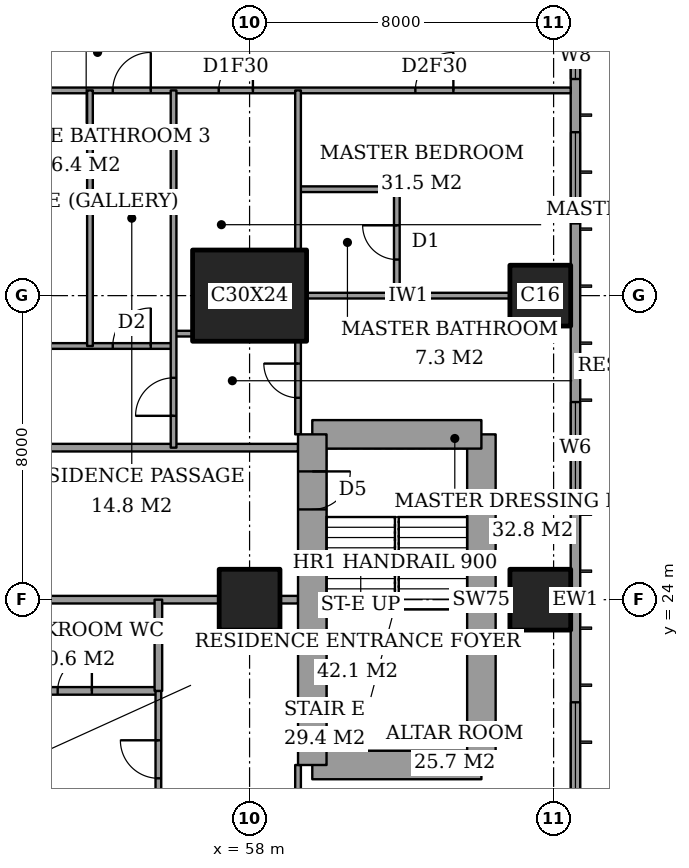
"""IFC4 building model, lengths in metres.
Left out: names, types, materials, properties, quantities, classifications, styles, units other than length and angle.
Written with IfcOpenShell. Run it as: python <this file> out.ifc"""

import sys

from ifc_helpers import new_model, si_unit, direction, frame, frame_2d, origin, origin_2d, place, context, subcontext, project, spatial, rectangle, extrude, element, fill, save


model = new_model("IFC4")
c1 = context("Model", 3, precision=1e-05, world=origin(), true_north=direction((0.0, 1.0)))
c2 = subcontext(c1, "Body", "Model", "MODEL_VIEW")
j1 = project(units=[si_unit("LENGTHUNIT", "METRE"), si_unit("PLANEANGLEUNIT", "RADIAN")], contexts=[c1])
p1 = place(None, origin())
s1 = spatial("IfcSite", under=j1, at=p1, CompositionType="ELEMENT")
p2 = place(p1, origin())
s2 = spatial("IfcBuilding", under=s1, at=p2, CompositionType="ELEMENT")
p3 = place(p2, frame((0.0, 0.0, 255.6)))
s3 = spatial("IfcBuildingStorey", under=s2, at=p3, CompositionType="ELEMENT", Elevation=255.6)
p4 = place(p3, frame((58.0, 24.0, 0.0), z_axis=(0.0, 0.0, 1.0), x_axis=(1.0, 0.0, 0.0)))
e1 = element("IfcColumn", 1, at=p4, inside=s3, PredefinedType="COLUMN", context=c2, shape_type="SweptSolid", body=[
    extrude(rectangle(XDim=1.6, YDim=1.6, at=origin_2d()), origin(), (0.0, 0.0, 1.0), 3.6),
])
p5 = place(p3, frame((58.0, 32.0, 0.0), z_axis=(0.0, 0.0, 1.0), x_axis=(1.0, 0.0, 0.0)))
e2 = element("IfcColumn", 2, at=p5, inside=s3, PredefinedType="COLUMN", context=c2, shape_type="SweptSolid", body=[
    extrude(rectangle(XDim=3.0, YDim=2.4, at=origin_2d()), origin(), (0.0, 0.0, 1.0), 3.6),
])
for number, where, z_axis, x_axis in (
    (3, (65.65, 24.0, 0.0), (0.0, 0.0, 1.0), (1.0, 0.0, 0.0)),
    (4, (65.65, 32.0, 0.0), (0.0, 0.0, 1.0), (1.0, 0.0, 0.0)),
):
    element("IfcColumn", number, at=place(p3, frame(where, z_axis=z_axis, x_axis=x_axis)), inside=s3, PredefinedType="COLUMN", context=c2, shape_type="SweptSolid", body=[
        extrude(rectangle(XDim=1.6, YDim=1.6, at=origin_2d()), origin(), (0.0, 0.0, 1.0), 3.6),
    ])
p6 = place(p3, frame((59.65, 19.65, 0.0), z_axis=(0.0, 0.0, 1.0), x_axis=(1.0, 0.0, 0.0)))
e5 = element("IfcWall", 5, at=p6, inside=s3, PredefinedType="SHEAR", context=c2, shape_type="SweptSolid", body=[
    extrude(rectangle(XDim=4.45, YDim=0.75, at=frame_2d((2.225, 0.0))), origin(), (0.0, 0.0, 1.0), 3.6),
])
p7 = place(p3, frame((64.1, 19.65, 0.0), z_axis=(0.0, 0.0, 1.0), x_axis=(0.0, 1.0, 0.0)))
e6 = element("IfcWall", 6, at=p7, inside=s3, PredefinedType="SHEAR", context=c2, shape_type="SweptSolid", body=[
    extrude(rectangle(XDim=8.7, YDim=0.75, at=frame_2d((4.35, 0.0))), origin(), (0.0, 0.0, 1.0), 3.6),
])
p8 = place(p3, frame((64.1, 28.35, 0.0), z_axis=(0.0, 0.0, 1.0), x_axis=(-1.0, 0.0, 0.0)))
e7 = element("IfcWall", 7, at=p8, inside=s3, PredefinedType="SHEAR", context=c2, shape_type="SweptSolid", body=[
    extrude(rectangle(XDim=4.45, YDim=0.75, at=frame_2d((2.225, 0.0))), origin(), (0.0, 0.0, 1.0), 3.6),
])
p9 = place(p3, frame((59.65, 28.35, 0.0), z_axis=(0.0, 0.0, 1.0), x_axis=(0.0, -1.0, 0.0)))
e8 = element("IfcWall", 8, at=p9, inside=s3, PredefinedType="SHEAR", context=c2, shape_type="SweptSolid", body=[
    extrude(rectangle(XDim=8.7, YDim=0.75, at=frame_2d((4.35, 0.0))), origin(), (0.0, 0.0, 1.0), 3.6),
])
p10 = place(p9, frame((0.975, 0.0, 0.0)))
e9 = element("IfcOpeningElement", 9, at=p10, cuts=e8, PredefinedType="OPENING", context=c2, shape_type="SweptSolid", body=[
    extrude(rectangle(XDim=1.0, YDim=2.1, at=frame_2d((0.5, 1.05))), frame((0.0, 0.385, 0.0), z_axis=(0.0, -1.0, 0.0), x_axis=(1.0, 0.0, 0.0)), (0.0, 0.0, 1.0), 0.77),
])
p11 = place(p3, frame((66.575, 3.175, 0.0), z_axis=(0.0, 0.0, 1.0), x_axis=(0.0, 1.0, 0.0)))
e10 = element("IfcWall", 10, at=p11, inside=s3, PredefinedType="SOLIDWALL", context=c2, shape_type="SweptSolid", body=[
    extrude(rectangle(XDim=41.65, YDim=0.25, at=frame_2d((20.825, 0.0))), origin(), (0.0, 0.0, 1.0), 3.6),
])
p12 = place(p11, frame((0.875, 0.0, 0.6)))
e11 = element("IfcOpeningElement", 11, at=p12, cuts=e10, PredefinedType="OPENING", context=c2, shape_type="SweptSolid", body=[
    extrude(rectangle(XDim=2.4, YDim=2.0, at=frame_2d((1.2, 1.0))), frame((0.0, 0.135, 0.0), z_axis=(0.0, -1.0, 0.0), x_axis=(1.0, 0.0, 0.0)), (0.0, 0.0, 1.0), 0.27),
])
p13 = place(p11, frame((6.6, 0.0, 0.6)))
e12 = element("IfcOpeningElement", 12, at=p13, cuts=e10, PredefinedType="OPENING", context=c2, shape_type="SweptSolid", body=[
    extrude(rectangle(XDim=1.2, YDim=2.0, at=frame_2d((0.6, 1.0))), frame((0.0, 0.135, 0.0), z_axis=(0.0, -1.0, 0.0), x_axis=(1.0, 0.0, 0.0)), (0.0, 0.0, 1.0), 0.27),
])
p14 = place(p11, frame((8.825, 0.0, 0.6)))
e13 = element("IfcOpeningElement", 13, at=p14, cuts=e10, PredefinedType="OPENING", context=c2, shape_type="SweptSolid", body=[
    extrude(rectangle(XDim=2.4, YDim=2.0, at=frame_2d((1.2, 1.0))), frame((0.0, 0.135, 0.0), z_axis=(0.0, -1.0, 0.0), x_axis=(1.0, 0.0, 0.0)), (0.0, 0.0, 1.0), 0.27),
])
p15 = place(p11, frame((15.725, 0.0, 0.6)))
e14 = element("IfcOpeningElement", 14, at=p15, cuts=e10, PredefinedType="OPENING", context=c2, shape_type="SweptSolid", body=[
    extrude(rectangle(XDim=2.4, YDim=2.0, at=frame_2d((1.2, 1.0))), frame((0.0, 0.135, 0.0), z_axis=(0.0, -1.0, 0.0), x_axis=(1.0, 0.0, 0.0)), (0.0, 0.0, 1.0), 0.27),
])
p16 = place(p11, frame((23.625, 0.0, 0.6)))
e15 = element("IfcOpeningElement", 15, at=p16, cuts=e10, PredefinedType="OPENING", context=c2, shape_type="SweptSolid", body=[
    extrude(rectangle(XDim=2.4, YDim=2.0, at=frame_2d((1.2, 1.0))), frame((0.0, 0.135, 0.0), z_axis=(0.0, -1.0, 0.0), x_axis=(1.0, 0.0, 0.0)), (0.0, 0.0, 1.0), 0.27),
])
p17 = place(p11, frame((30.725, 0.0, 0.6)))
e16 = element("IfcOpeningElement", 16, at=p17, cuts=e10, PredefinedType="OPENING", context=c2, shape_type="SweptSolid", body=[
    extrude(rectangle(XDim=2.4, YDim=2.0, at=frame_2d((1.2, 1.0))), frame((0.0, 0.135, 0.0), z_axis=(0.0, -1.0, 0.0), x_axis=(1.0, 0.0, 0.0)), (0.0, 0.0, 1.0), 0.27),
])
p18 = place(p11, frame((34.525, 0.0, 0.6)))
e17 = element("IfcOpeningElement", 17, at=p18, cuts=e10, PredefinedType="OPENING", context=c2, shape_type="SweptSolid", body=[
    extrude(rectangle(XDim=1.2, YDim=2.0, at=frame_2d((0.6, 1.0))), frame((0.0, 0.135, 0.0), z_axis=(0.0, -1.0, 0.0), x_axis=(1.0, 0.0, 0.0)), (0.0, 0.0, 1.0), 0.27),
])
p19 = place(p11, frame((38.375, 0.0, 0.6)))
e18 = element("IfcOpeningElement", 18, at=p19, cuts=e10, PredefinedType="OPENING", context=c2, shape_type="SweptSolid", body=[
    extrude(rectangle(XDim=2.4, YDim=2.0, at=frame_2d((1.2, 1.0))), frame((0.0, 0.135, 0.0), z_axis=(0.0, -1.0, 0.0), x_axis=(1.0, 0.0, 0.0)), (0.0, 0.0, 1.0), 0.27),
])
p20 = place(p3, frame((51.2, 21.6, 0.0), z_axis=(0.0, 0.0, 1.0), x_axis=(1.0, 0.0, 0.0)))
e19 = element("IfcWall", 19, at=p20, inside=s3, PredefinedType="PARTITIONING", context=c2, shape_type="SweptSolid", body=[
    extrude(rectangle(XDim=4.4, YDim=0.2, at=frame_2d((2.2, 0.0))), origin(), (0.0, 0.0, 1.0), 3.35),
])
p21 = place(p20, frame((1.75, 0.0, 0.0)))
e20 = element("IfcOpeningElement", 20, at=p21, cuts=e19, PredefinedType="OPENING", context=c2, shape_type="SweptSolid", body=[
    extrude(rectangle(XDim=0.9, YDim=2.1, at=frame_2d((0.45, 1.05))), frame((0.0, 0.11, 0.0), z_axis=(0.0, -1.0, 0.0), x_axis=(1.0, 0.0, 0.0)), (0.0, 0.0, 1.0), 0.22),
])
p22 = place(p3, frame((50.8, 24.0, 0.0), z_axis=(0.0, 0.0, 1.0), x_axis=(1.0, 0.0, 0.0)))
e21 = element("IfcWall", 21, at=p22, inside=s3, PredefinedType="PARTITIONING", context=c2, shape_type="SweptSolid", body=[
    extrude(rectangle(XDim=6.4, YDim=0.2, at=frame_2d((3.2, 0.0))), origin(), (0.0, 0.0, 1.0), 3.35),
])
p23 = place(p3, frame((58.8, 24.0, 0.0), z_axis=(0.0, 0.0, 1.0), x_axis=(1.0, 0.0, 0.0)))
e22 = element("IfcWall", 22, at=p23, inside=s3, PredefinedType="PARTITIONING", context=c2, shape_type="SweptSolid", body=[
    extrude(rectangle(XDim=0.475, YDim=0.2, at=frame_2d((0.237, 0.0))), origin(), (0.0, 0.0, 1.0), 3.35),
])
p24 = place(p3, frame((64.475, 24.0, 0.0), z_axis=(0.0, 0.0, 1.0), x_axis=(1.0, 0.0, 0.0)))
e23 = element("IfcWall", 23, at=p24, inside=s3, PredefinedType="PARTITIONING", context=c2, shape_type="SweptSolid", body=[
    extrude(rectangle(XDim=0.375, YDim=0.15, at=frame_2d((0.188, 0.0))), origin(), (0.0, 0.0, 1.0), 3.35),
])
p25 = place(p3, frame((42.0, 28.0, 0.0), z_axis=(0.0, 0.0, 1.0), x_axis=(1.0, 0.0, 0.0)))
e24 = element("IfcWall", 24, at=p25, inside=s3, PredefinedType="PARTITIONING", context=c2, shape_type="SweptSolid", body=[
    extrude(rectangle(XDim=17.275, YDim=0.2, at=frame_2d((8.637, 0.0))), origin(), (0.0, 0.0, 1.0), 3.35),
])
p26 = place(p25, frame((9.4, 0.0, 0.0)))
e25 = element("IfcOpeningElement", 25, at=p26, cuts=e24, PredefinedType="OPENING", context=c2, shape_type="SweptSolid", body=[
    extrude(rectangle(XDim=1.2, YDim=2.4, at=frame_2d((0.6, 1.2))), frame((0.0, 0.11, 0.0), z_axis=(0.0, -1.0, 0.0), x_axis=(1.0, 0.0, 0.0)), (0.0, 0.0, 1.0), 0.22),
])
p27 = place(p3, frame((51.6, 30.675, 0.0), z_axis=(0.0, 0.0, 1.0), x_axis=(1.0, 0.0, 0.0)))
e26 = element("IfcWall", 26, at=p27, inside=s3, PredefinedType="PARTITIONING", context=c2, shape_type="SweptSolid", body=[
    extrude(rectangle(XDim=4.4, YDim=0.15, at=frame_2d((2.2, 0.0))), origin(), (0.0, 0.0, 1.0), 3.35),
])
p28 = place(p27, frame((2.8, 0.0, 0.0)))
e27 = element("IfcOpeningElement", 27, at=p28, cuts=e26, PredefinedType="OPENING", context=c2, shape_type="SweptSolid", body=[
    extrude(rectangle(XDim=1.0, YDim=2.1, at=frame_2d((0.5, 1.05))), frame((0.0, 0.085, 0.0), z_axis=(0.0, -1.0, 0.0), x_axis=(1.0, 0.0, 0.0)), (0.0, 0.0, 1.0), 0.17),
])
p29 = place(p3, frame((56.0, 31.0, 0.0), z_axis=(0.0, 0.0, 1.0), x_axis=(1.0, 0.0, 0.0)))
e28 = element("IfcWall", 28, at=p29, inside=s3, PredefinedType="PARTITIONING", context=c2, shape_type="SweptSolid", body=[
    extrude(rectangle(XDim=0.5, YDim=0.15, at=frame_2d((0.25, 0.0))), origin(), (0.0, 0.0, 1.0), 3.35),
])
p30 = place(p3, frame((59.5, 32.0, 0.0), z_axis=(0.0, 0.0, 1.0), x_axis=(1.0, 0.0, 0.0)))
e29 = element("IfcWall", 29, at=p30, inside=s3, PredefinedType="PARTITIONING", context=c2, shape_type="SweptSolid", body=[
    extrude(rectangle(XDim=5.35, YDim=0.15, at=frame_2d((2.675, 0.0))), origin(), (0.0, 0.0, 1.0), 2.634),
])
p31 = place(p3, frame((59.275, 34.8, 0.0), z_axis=(0.0, 0.0, 1.0), x_axis=(1.0, 0.0, 0.0)))
e30 = element("IfcWall", 30, at=p31, inside=s3, PredefinedType="PARTITIONING", context=c2, shape_type="SweptSolid", body=[
    extrude(rectangle(XDim=2.6, YDim=0.15, at=frame_2d((1.3, 0.0))), origin(), (0.0, 0.0, 1.0), 3.35),
])
p32 = place(p3, frame((41.439, 37.4, 0.0), z_axis=(0.0, 0.0, 1.0), x_axis=(1.0, 0.0, 0.0)))
e31 = element("IfcWall", 31, at=p32, inside=s3, PredefinedType="PARTITIONING", context=c2, shape_type="SweptSolid", body=[
    extrude(rectangle(XDim=25.011, YDim=0.15, at=frame_2d((12.505, 0.0))), origin(), (0.0, 0.0, 1.0), 3.35),
])
p33 = place(p32, frame((12.961, 0.0, 0.0)))
e32 = element("IfcOpeningElement", 32, at=p33, cuts=e31, PredefinedType="OPENING", context=c2, shape_type="SweptSolid", body=[
    extrude(rectangle(XDim=1.0, YDim=2.1, at=frame_2d((0.5, 1.05))), frame((0.0, 0.085, 0.0), z_axis=(0.0, -1.0, 0.0), x_axis=(1.0, 0.0, 0.0)), (0.0, 0.0, 1.0), 0.17),
])
p34 = place(p32, frame((20.924, 0.0, 0.0)))
e33 = element("IfcOpeningElement", 33, at=p34, cuts=e31, PredefinedType="OPENING", context=c2, shape_type="SweptSolid", body=[
    extrude(rectangle(XDim=1.0, YDim=2.1, at=frame_2d((0.5, 1.05))), frame((0.0, 0.085, 0.0), z_axis=(0.0, -1.0, 0.0), x_axis=(1.0, 0.0, 0.0)), (0.0, 0.0, 1.0), 0.17),
])
p35 = place(p32, frame((15.749, 0.0, 0.0)))
e34 = element("IfcOpeningElement", 34, at=p35, cuts=e31, PredefinedType="OPENING", context=c2, shape_type="SweptSolid", body=[
    extrude(rectangle(XDim=0.9, YDim=2.1, at=frame_2d((0.45, 1.05))), frame((0.0, 0.085, 0.0), z_axis=(0.0, -1.0, 0.0), x_axis=(1.0, 0.0, 0.0)), (0.0, 0.0, 1.0), 0.17),
])
p36 = place(p32, frame((8.961, 0.0, 0.0)))
e35 = element("IfcOpeningElement", 35, at=p36, cuts=e31, PredefinedType="OPENING", context=c2, shape_type="SweptSolid", body=[
    extrude(rectangle(XDim=1.0, YDim=2.1, at=frame_2d((0.5, 1.05))), frame((0.0, 0.085, 0.0), z_axis=(0.0, -1.0, 0.0), x_axis=(1.0, 0.0, 0.0)), (0.0, 0.0, 1.0), 0.17),
])
p37 = place(p32, frame((2.836, 0.0, 0.0)))
e36 = element("IfcOpeningElement", 36, at=p37, cuts=e31, PredefinedType="OPENING", context=c2, shape_type="SweptSolid", body=[
    extrude(rectangle(XDim=1.0, YDim=2.1, at=frame_2d((0.5, 1.05))), frame((0.0, 0.085, 0.0), z_axis=(0.0, -1.0, 0.0), x_axis=(1.0, 0.0, 0.0)), (0.0, 0.0, 1.0), 0.17),
])
p38 = place(p3, frame((53.8, 30.675, 0.0), z_axis=(0.0, 0.0, 1.0), x_axis=(0.0, 1.0, 0.0)))
e37 = element("IfcWall", 37, at=p38, inside=s3, PredefinedType="PARTITIONING", context=c2, shape_type="SweptSolid", body=[
    extrude(rectangle(XDim=6.725, YDim=0.15, at=frame_2d((3.362, 0.0))), origin(), (0.0, 0.0, 1.0), 3.35),
])
p39 = place(p3, frame((55.6, 21.6, 0.0), z_axis=(0.0, 0.0, 1.0), x_axis=(0.0, 1.0, 0.0)))
e38 = element("IfcWall", 38, at=p39, inside=s3, PredefinedType="PARTITIONING", context=c2, shape_type="SweptSolid", body=[
    extrude(rectangle(XDim=2.4, YDim=0.2, at=frame_2d((1.2, 0.0))), origin(), (0.0, 0.0, 1.0), 3.35),
])
p40 = place(p3, frame((55.6, 14.6, 0.0), z_axis=(0.0, 0.0, 1.0), x_axis=(0.0, 1.0, 0.0)))
e39 = element("IfcWall", 39, at=p40, inside=s3, PredefinedType="PARTITIONING", context=c2, shape_type="SweptSolid", body=[
    extrude(rectangle(XDim=7.0, YDim=0.15, at=frame_2d((3.5, 0.0))), origin(), (0.0, 0.0, 1.0), 3.35),
])
p41 = place(p40, frame((4.7, 0.0, 0.0)))
e40 = element("IfcOpeningElement", 40, at=p41, cuts=e39, PredefinedType="OPENING", context=c2, shape_type="SweptSolid", body=[
    extrude(rectangle(XDim=1.0, YDim=2.1, at=frame_2d((0.5, 1.05))), frame((0.0, 0.085, 0.0), z_axis=(0.0, -1.0, 0.0), x_axis=(1.0, 0.0, 0.0)), (0.0, 0.0, 1.0), 0.17),
])
p42 = place(p3, frame((56.0, 28.0, 0.0), z_axis=(0.0, 0.0, 1.0), x_axis=(0.0, 1.0, 0.0)))
e41 = element("IfcWall", 41, at=p42, inside=s3, PredefinedType="PARTITIONING", context=c2, shape_type="SweptSolid", body=[
    extrude(rectangle(XDim=9.4, YDim=0.15, at=frame_2d((4.7, 0.0))), origin(), (0.0, 0.0, 1.0), 3.35),
])
p43 = place(p42, frame((0.837, 0.0, 0.0)))
e42 = element("IfcOpeningElement", 42, at=p43, cuts=e41, PredefinedType="OPENING", context=c2, shape_type="SweptSolid", body=[
    extrude(rectangle(XDim=1.0, YDim=2.1, at=frame_2d((0.5, 1.05))), frame((0.0, 0.085, 0.0), z_axis=(0.0, -1.0, 0.0), x_axis=(1.0, 0.0, 0.0)), (0.0, 0.0, 1.0), 0.17),
])
p44 = place(p3, frame((59.275, 17.2, 0.0), z_axis=(0.0, 0.0, 1.0), x_axis=(0.0, 1.0, 0.0)))
e43 = element("IfcWall", 43, at=p44, inside=s3, PredefinedType="PARTITIONING", context=c2, shape_type="SweptSolid", body=[
    extrude(rectangle(XDim=2.45, YDim=0.15, at=frame_2d((1.225, 0.0))), origin(), (0.0, 0.0, 1.0), 3.35),
])
p45 = place(p44, frame((0.538, 0.0, 0.0)))
e44 = element("IfcOpeningElement", 44, at=p45, cuts=e43, PredefinedType="OPENING", context=c2, shape_type="SweptSolid", body=[
    extrude(rectangle(XDim=1.0, YDim=2.1, at=frame_2d((0.5, 1.05))), frame((0.0, 0.085, 0.0), z_axis=(0.0, -1.0, 0.0), x_axis=(1.0, 0.0, 0.0)), (0.0, 0.0, 1.0), 0.17),
])
p46 = place(p3, frame((59.275, 28.35, 0.0), z_axis=(0.0, 0.0, 1.0), x_axis=(0.0, 1.0, 0.0)))
e45 = element("IfcWall", 45, at=p46, inside=s3, PredefinedType="PARTITIONING", context=c2, shape_type="SweptSolid", body=[
    extrude(rectangle(XDim=2.45, YDim=0.15, at=frame_2d((1.225, 0.0))), origin(), (0.0, 0.0, 1.0), 3.35),
])
p47 = place(p46, frame((0.962, 0.0, 0.0)))
e46 = element("IfcOpeningElement", 46, at=p47, cuts=e45, PredefinedType="OPENING", context=c2, shape_type="SweptSolid", body=[
    extrude(rectangle(XDim=0.9, YDim=2.1, at=frame_2d((0.45, 1.05))), frame((0.0, 0.085, 0.0), z_axis=(0.0, -1.0, 0.0), x_axis=(1.0, 0.0, 0.0)), (0.0, 0.0, 1.0), 0.17),
])
p48 = place(p3, frame((59.275, 33.2, 0.0), z_axis=(0.0, 0.0, 1.0), x_axis=(0.0, 1.0, 0.0)))
e47 = element("IfcWall", 47, at=p48, inside=s3, PredefinedType="PARTITIONING", context=c2, shape_type="SweptSolid", body=[
    extrude(rectangle(XDim=4.2, YDim=0.15, at=frame_2d((2.1, 0.0))), origin(), (0.0, 0.0, 1.0), 3.35),
])
p49 = place(p3, frame((61.875, 32.0, 0.0), z_axis=(0.0, 0.0, 1.0), x_axis=(0.0, 1.0, 0.0)))
e48 = element("IfcWall", 48, at=p49, inside=s3, PredefinedType="PARTITIONING", context=c2, shape_type="SweptSolid", body=[
    extrude(rectangle(XDim=2.8, YDim=0.15, at=frame_2d((1.4, 0.0))), origin(), (0.0, 0.0, 1.0), 3.35),
])
p50 = place(p49, frame((0.95, 0.0, 0.0)))
e49 = element("IfcOpeningElement", 49, at=p50, cuts=e48, PredefinedType="OPENING", context=c2, shape_type="SweptSolid", body=[
    extrude(rectangle(XDim=0.9, YDim=2.1, at=frame_2d((0.45, 1.05))), frame((0.0, 0.085, 0.0), z_axis=(0.0, -1.0, 0.0), x_axis=(1.0, 0.0, 0.0)), (0.0, 0.0, 1.0), 0.17),
])
p51 = place(p15, origin())
e50 = element("IfcWindow", 50, at=p51, inside=s3, PartitioningType="SINGLE_PANEL", PredefinedType="WINDOW", context=c2, shape_type="SweptSolid", body=[
    extrude(rectangle(XDim=2.4, YDim=2.0, at=frame_2d((1.2, 1.0))), frame((0.0, 0.03, 0.0), z_axis=(0.0, -1.0, 0.0), x_axis=(1.0, 0.0, 0.0)), (0.0, 0.0, 1.0), 0.06),
])
fill(e14, e50)
p52 = place(p16, origin())
e51 = element("IfcWindow", 51, at=p52, inside=s3, PartitioningType="SINGLE_PANEL", PredefinedType="WINDOW", context=c2, shape_type="SweptSolid", body=[
    extrude(rectangle(XDim=2.4, YDim=2.0, at=frame_2d((1.2, 1.0))), frame((0.0, 0.03, 0.0), z_axis=(0.0, -1.0, 0.0), x_axis=(1.0, 0.0, 0.0)), (0.0, 0.0, 1.0), 0.06),
])
fill(e15, e51)
p53 = place(p17, origin())
e52 = element("IfcWindow", 52, at=p53, inside=s3, PartitioningType="SINGLE_PANEL", PredefinedType="WINDOW", context=c2, shape_type="SweptSolid", body=[
    extrude(rectangle(XDim=2.4, YDim=2.0, at=frame_2d((1.2, 1.0))), frame((0.0, 0.03, 0.0), z_axis=(0.0, -1.0, 0.0), x_axis=(1.0, 0.0, 0.0)), (0.0, 0.0, 1.0), 0.06),
])
fill(e16, e52)
p54 = place(p18, origin())
e53 = element("IfcWindow", 53, at=p54, inside=s3, PartitioningType="SINGLE_PANEL", PredefinedType="WINDOW", context=c2, shape_type="SweptSolid", body=[
    extrude(rectangle(XDim=1.2, YDim=2.0, at=frame_2d((0.6, 1.0))), frame((0.0, 0.03, 0.0), z_axis=(0.0, -1.0, 0.0), x_axis=(1.0, 0.0, 0.0)), (0.0, 0.0, 1.0), 0.06),
])
fill(e17, e53)
p55 = place(p41, origin())
e54 = element("IfcDoor", 54, at=p55, inside=s3, OperationType="SINGLE_SWING_LEFT", PredefinedType="DOOR", context=c2, shape_type="SweptSolid", body=[
    extrude(rectangle(XDim=1.0, YDim=2.1, at=frame_2d((0.5, 1.05))), frame((0.0, 0.025, 0.0), z_axis=(0.0, -1.0, 0.0), x_axis=(1.0, 0.0, 0.0)), (0.0, 0.0, 1.0), 0.05),
])
fill(e40, e54)
p56 = place(p21, origin())
e55 = element("IfcDoor", 55, at=p56, inside=s3, OperationType="SINGLE_SWING_LEFT", PredefinedType="DOOR", context=c2, shape_type="SweptSolid", body=[
    extrude(rectangle(XDim=0.9, YDim=2.1, at=frame_2d((0.45, 1.05))), frame((0.0, 0.025, 0.0), z_axis=(0.0, -1.0, 0.0), x_axis=(1.0, 0.0, 0.0)), (0.0, 0.0, 1.0), 0.05),
])
fill(e20, e55)
p57 = place(p33, origin())
e56 = element("IfcDoor", 56, at=p57, inside=s3, OperationType="SINGLE_SWING_LEFT", PredefinedType="DOOR", context=c2, shape_type="SweptSolid", body=[
    extrude(rectangle(XDim=1.0, YDim=2.1, at=frame_2d((0.5, 1.05))), frame((0.0, 0.025, 0.0), z_axis=(0.0, -1.0, 0.0), x_axis=(1.0, 0.0, 0.0)), (0.0, 0.0, 1.0), 0.05),
])
fill(e32, e56)
p58 = place(p50, origin())
e57 = element("IfcDoor", 57, at=p58, inside=s3, OperationType="SINGLE_SWING_LEFT", PredefinedType="DOOR", context=c2, shape_type="SweptSolid", body=[
    extrude(rectangle(XDim=0.9, YDim=2.1, at=frame_2d((0.45, 1.05))), frame((0.0, 0.025, 0.0), z_axis=(0.0, -1.0, 0.0), x_axis=(1.0, 0.0, 0.0)), (0.0, 0.0, 1.0), 0.05),
])
fill(e49, e57)
p59 = place(p34, origin())
e58 = element("IfcDoor", 58, at=p59, inside=s3, OperationType="SINGLE_SWING_LEFT", PredefinedType="DOOR", context=c2, shape_type="SweptSolid", body=[
    extrude(rectangle(XDim=1.0, YDim=2.1, at=frame_2d((0.5, 1.05))), frame((0.0, 0.025, 0.0), z_axis=(0.0, -1.0, 0.0), x_axis=(1.0, 0.0, 0.0)), (0.0, 0.0, 1.0), 0.05),
])
fill(e33, e58)
p60 = place(p47, origin())
e59 = element("IfcDoor", 59, at=p60, inside=s3, OperationType="SINGLE_SWING_LEFT", PredefinedType="DOOR", context=c2, shape_type="SweptSolid", body=[
    extrude(rectangle(XDim=0.9, YDim=2.1, at=frame_2d((0.45, 1.05))), frame((0.0, 0.025, 0.0), z_axis=(0.0, -1.0, 0.0), x_axis=(1.0, 0.0, 0.0)), (0.0, 0.0, 1.0), 0.05),
])
fill(e46, e59)
p61 = place(p35, origin())
e60 = element("IfcDoor", 60, at=p61, inside=s3, OperationType="SINGLE_SWING_LEFT", PredefinedType="DOOR", context=c2, shape_type="SweptSolid", body=[
    extrude(rectangle(XDim=0.9, YDim=2.1, at=frame_2d((0.45, 1.05))), frame((0.0, 0.025, 0.0), z_axis=(0.0, -1.0, 0.0), x_axis=(1.0, 0.0, 0.0)), (0.0, 0.0, 1.0), 0.05),
])
fill(e34, e60)
p62 = place(p43, origin())
e61 = element("IfcDoor", 61, at=p62, inside=s3, OperationType="SINGLE_SWING_RIGHT", PredefinedType="DOOR", context=c2, shape_type="SweptSolid", body=[
    extrude(rectangle(XDim=1.0, YDim=2.1, at=frame_2d((0.5, 1.05))), frame((0.0, 0.025, 0.0), z_axis=(0.0, -1.0, 0.0), x_axis=(1.0, 0.0, 0.0)), (0.0, 0.0, 1.0), 0.05),
])
fill(e42, e61)
p63 = place(p28, origin())
e62 = element("IfcDoor", 62, at=p63, inside=s3, OperationType="SINGLE_SWING_LEFT", PredefinedType="DOOR", context=c2, shape_type="SweptSolid", body=[
    extrude(rectangle(XDim=1.0, YDim=2.1, at=frame_2d((0.5, 1.05))), frame((0.0, 0.025, 0.0), z_axis=(0.0, -1.0, 0.0), x_axis=(1.0, 0.0, 0.0)), (0.0, 0.0, 1.0), 0.05),
])
fill(e27, e62)
p64 = place(p10, origin())
e63 = element("IfcDoor", 63, at=p64, inside=s3, OperationType="SINGLE_SWING_RIGHT", PredefinedType="DOOR", context=c2, shape_type="SweptSolid", body=[
    extrude(rectangle(XDim=1.0, YDim=2.1, at=frame_2d((0.5, 1.05))), frame((0.0, 0.025, 0.0), z_axis=(0.0, -1.0, 0.0), x_axis=(1.0, 0.0, 0.0)), (0.0, 0.0, 1.0), 0.05),
])
fill(e9, e63)
save(model, sys.argv[1])
